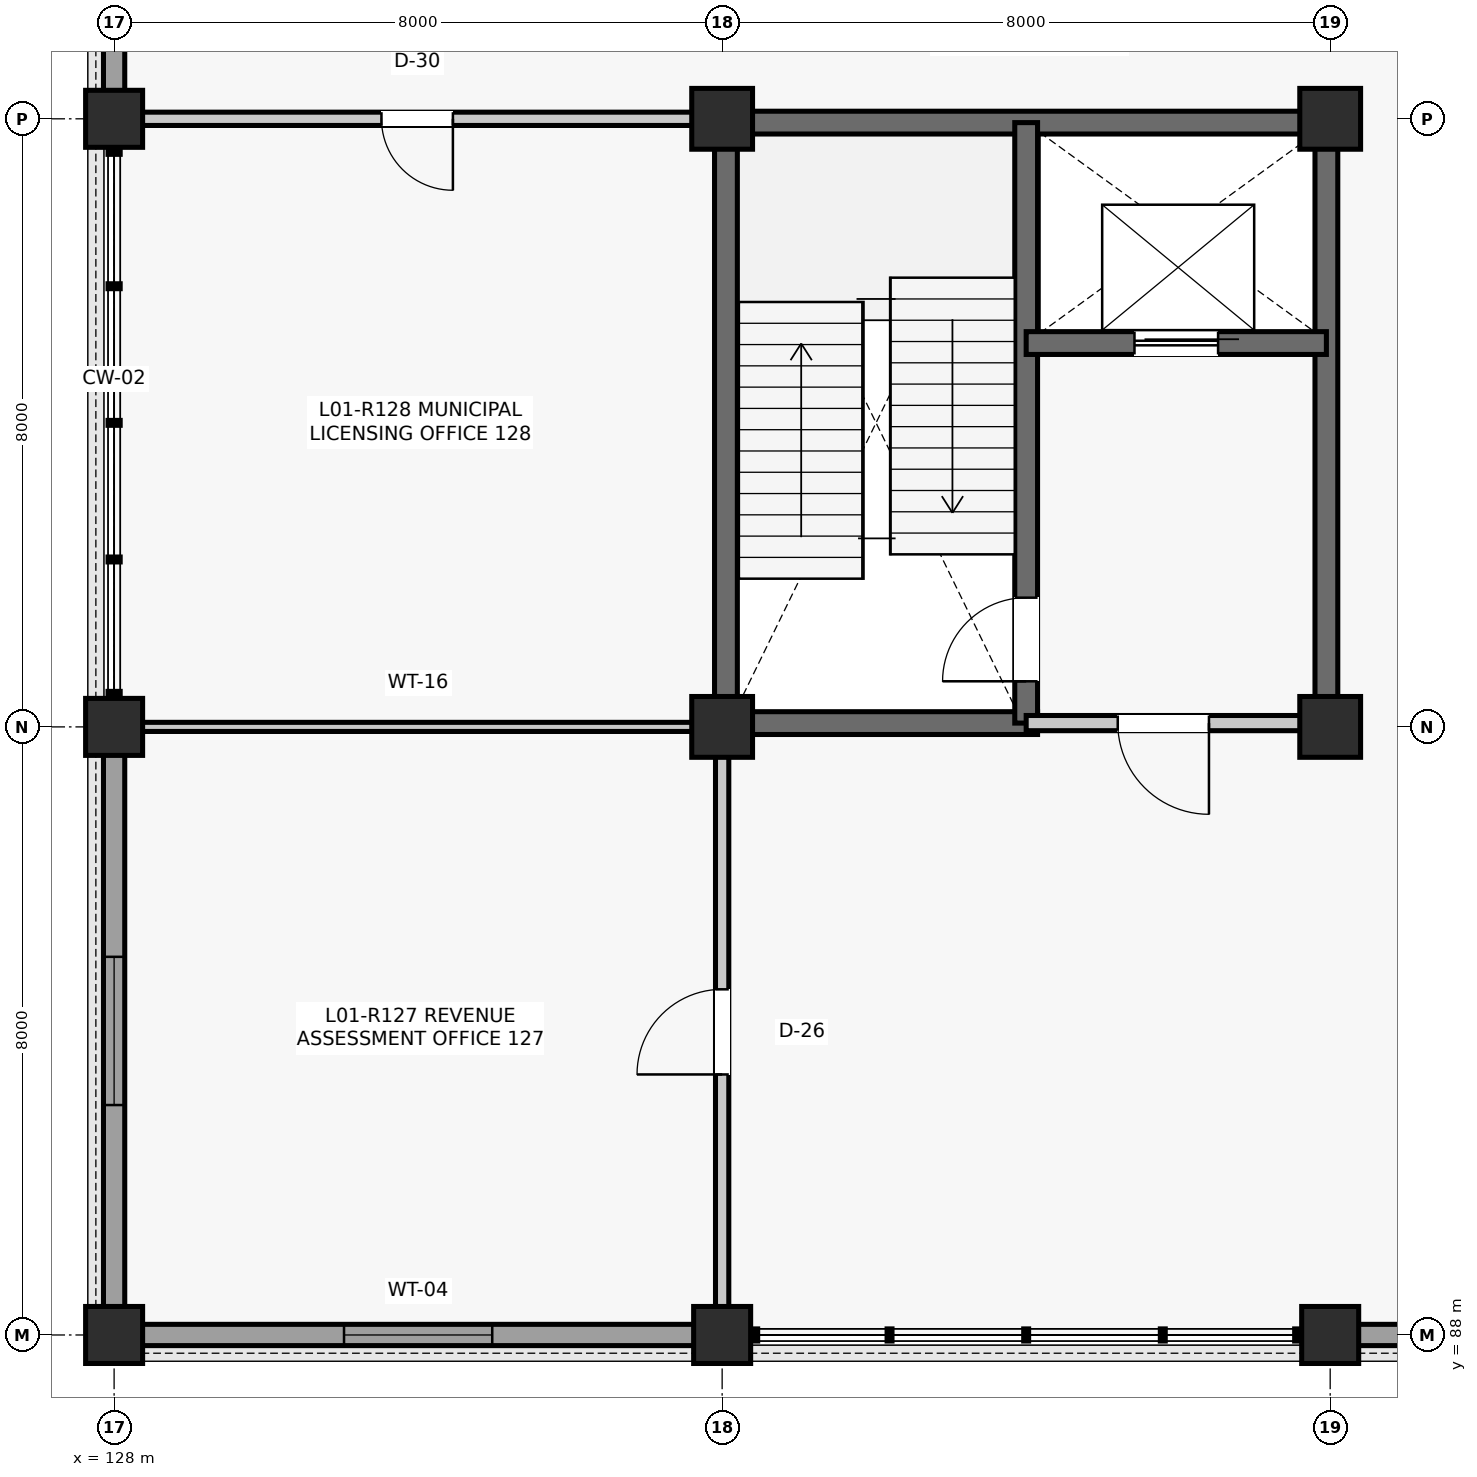
"""IFC4 building model, lengths in metres.
Left out: names, types, materials, properties, quantities, classifications, styles, units other than length and angle.
Written with IfcOpenShell. Run it as: python <this file> out.ifc"""

import sys

from ifc_helpers import new_model, si_unit, direction, frame, frame_2d, origin, origin_2d, place, context, subcontext, project, spatial, rectangle, extrude, element, fill, save


model = new_model("IFC4")
c1 = context("Model", 3, precision=1e-05, world=origin(), true_north=direction((0.0, 1.0)))
c2 = subcontext(c1, "Body", "Model", "MODEL_VIEW")
j1 = project(units=[si_unit("LENGTHUNIT", "METRE"), si_unit("PLANEANGLEUNIT", "RADIAN")], contexts=[c1])
p1 = place(None, origin())
s1 = spatial("IfcSite", under=j1, at=p1, CompositionType="ELEMENT")
p2 = place(p1, origin())
s2 = spatial("IfcBuilding", under=s1, at=p2, CompositionType="ELEMENT")
p3 = place(p2, frame((0.0, 0.0, 5.28)))
s3 = spatial("IfcBuildingStorey", under=s2, at=p3, CompositionType="ELEMENT", Elevation=5.28)
for number, where, z_axis, x_axis in (
    (1, (128.0, 88.0, 0.0), (0.0, 0.0, 1.0), (1.0, 0.0, 0.0)),
    (2, (128.0, 96.0, 0.0), (0.0, 0.0, 1.0), (1.0, 0.0, 0.0)),
    (3, (128.0, 104.0, 0.0), (0.0, 0.0, 1.0), (1.0, 0.0, 0.0)),
    (4, (136.0, 88.0, 0.0), (0.0, 0.0, 1.0), (1.0, 0.0, 0.0)),
):
    element("IfcColumn", number, at=place(p3, frame(where, z_axis=z_axis, x_axis=x_axis)), inside=s3, PredefinedType="COLUMN", context=c2, shape_type="SweptSolid", body=[
        extrude(rectangle(XDim=0.75, YDim=0.75, at=origin_2d()), origin(), (0.0, 0.0, 1.0), 4.62),
    ])
for number, where, z_axis, x_axis in (
    (5, (136.0, 96.0, 0.0), (0.0, 0.0, 1.0), (1.0, 0.0, 0.0)),
    (6, (136.0, 104.0, 0.0), (0.0, 0.0, 1.0), (1.0, 0.0, 0.0)),
):
    element("IfcColumn", number, at=place(p3, frame(where, z_axis=z_axis, x_axis=x_axis)), inside=s3, PredefinedType="COLUMN", context=c2, shape_type="SweptSolid", body=[
        extrude(rectangle(XDim=0.8, YDim=0.8, at=origin_2d()), origin(), (0.0, 0.0, 1.0), 4.62),
    ])
p4 = place(p3, frame((144.0, 88.0, 0.0), z_axis=(0.0, 0.0, 1.0), x_axis=(1.0, 0.0, 0.0)))
e7 = element("IfcColumn", 7, at=p4, inside=s3, PredefinedType="COLUMN", context=c2, shape_type="SweptSolid", body=[
    extrude(rectangle(XDim=0.75, YDim=0.75, at=origin_2d()), origin(), (0.0, 0.0, 1.0), 4.62),
])
for number, where, z_axis, x_axis in (
    (8, (144.0, 96.0, 0.0), (0.0, 0.0, 1.0), (1.0, 0.0, 0.0)),
    (9, (144.0, 104.0, 0.0), (0.0, 0.0, 1.0), (1.0, 0.0, 0.0)),
):
    element("IfcColumn", number, at=place(p3, frame(where, z_axis=z_axis, x_axis=x_axis)), inside=s3, PredefinedType="COLUMN", context=c2, shape_type="SweptSolid", body=[
        extrude(rectangle(XDim=0.8, YDim=0.8, at=origin_2d()), origin(), (0.0, 0.0, 1.0), 4.62),
    ])
p5 = place(p3, frame((128.36, 88.0, 0.0), z_axis=(0.0, 0.0, 1.0), x_axis=(1.0, 0.0, 0.0)))
e10 = element("IfcWall", 10, at=p5, inside=s3, PredefinedType="SOLIDWALL", context=c2, shape_type="SweptSolid", body=[
    extrude(rectangle(XDim=7.28, YDim=0.28, at=frame_2d((3.64, 0.0))), origin(), (0.0, 0.0, 1.0), 3.91),
])
p6 = place(p5, frame((2.665, 0.0, 0.9)))
e11 = element("IfcOpeningElement", 11, at=p6, cuts=e10, PredefinedType="OPENING", context=c2, shape_type="SweptSolid", body=[
    extrude(rectangle(XDim=1.95, YDim=2.45, at=frame_2d((0.975, 1.225))), frame((0.0, 0.15, 0.0), z_axis=(0.0, -1.0, 0.0), x_axis=(1.0, 0.0, 0.0)), (0.0, 0.0, 1.0), 0.3),
])
p7 = place(p3, frame((128.0, 88.36, 0.0), z_axis=(0.0, 0.0, 1.0), x_axis=(0.0, 1.0, 0.0)))
e12 = element("IfcWall", 12, at=p7, inside=s3, PredefinedType="SOLIDWALL", context=c2, shape_type="SweptSolid", body=[
    extrude(rectangle(XDim=7.28, YDim=0.28, at=frame_2d((3.64, 0.0))), origin(), (0.0, 0.0, 1.0), 3.91),
])
p8 = place(p7, frame((2.665, 0.0, 0.9)))
e13 = element("IfcOpeningElement", 13, at=p8, cuts=e12, PredefinedType="OPENING", context=c2, shape_type="SweptSolid", body=[
    extrude(rectangle(XDim=1.95, YDim=2.45, at=frame_2d((0.975, 1.225))), frame((0.0, 0.15, 0.0), z_axis=(0.0, -1.0, 0.0), x_axis=(1.0, 0.0, 0.0)), (0.0, 0.0, 1.0), 0.3),
])
p9 = place(p3, frame((128.0, 104.36, 0.0), z_axis=(0.0, 0.0, 1.0), x_axis=(0.0, 1.0, 0.0)))
e14 = element("IfcWall", 14, at=p9, inside=s3, PredefinedType="SOLIDWALL", context=c2, shape_type="SweptSolid", body=[
    extrude(rectangle(XDim=7.28, YDim=0.28, at=frame_2d((3.64, 0.0))), origin(), (0.0, 0.0, 1.0), 3.914),
])
p10 = place(p9, frame((0.735, 0.0, 0.95)))
e15 = element("IfcOpeningElement", 15, at=p10, cuts=e14, PredefinedType="OPENING", context=c2, shape_type="SweptSolid", body=[
    extrude(rectangle(XDim=1.15, YDim=1.65, at=frame_2d((0.575, 0.825))), frame((0.0, 0.15, 0.0), z_axis=(0.0, -1.0, 0.0), x_axis=(1.0, 0.0, 0.0)), (0.0, 0.0, 1.0), 0.3),
])
p11 = place(p9, frame((5.395, 0.0, 0.95)))
e16 = element("IfcOpeningElement", 16, at=p11, cuts=e14, PredefinedType="OPENING", context=c2, shape_type="SweptSolid", body=[
    extrude(rectangle(XDim=1.15, YDim=1.65, at=frame_2d((0.575, 0.825))), frame((0.0, 0.15, 0.0), z_axis=(0.0, -1.0, 0.0), x_axis=(1.0, 0.0, 0.0)), (0.0, 0.0, 1.0), 0.3),
])
p12 = place(p3, frame((144.36, 88.0, 0.0), z_axis=(0.0, 0.0, 1.0), x_axis=(1.0, 0.0, 0.0)))
e17 = element("IfcWall", 17, at=p12, inside=s3, PredefinedType="SOLIDWALL", context=c2, shape_type="SweptSolid", body=[
    extrude(rectangle(XDim=7.28, YDim=0.28, at=frame_2d((3.64, 0.0))), origin(), (0.0, 0.0, 1.0), 3.914),
])
p13 = place(p12, frame((0.735, 0.0, 0.95)))
e18 = element("IfcOpeningElement", 18, at=p13, cuts=e17, PredefinedType="OPENING", context=c2, shape_type="SweptSolid", body=[
    extrude(rectangle(XDim=1.15, YDim=1.65, at=frame_2d((0.575, 0.825))), frame((0.0, 0.15, 0.0), z_axis=(0.0, -1.0, 0.0), x_axis=(1.0, 0.0, 0.0)), (0.0, 0.0, 1.0), 0.3),
])
p14 = place(p12, frame((5.395, 0.0, 0.95)))
e19 = element("IfcOpeningElement", 19, at=p14, cuts=e17, PredefinedType="OPENING", context=c2, shape_type="SweptSolid", body=[
    extrude(rectangle(XDim=1.15, YDim=1.65, at=frame_2d((0.575, 0.825))), frame((0.0, 0.15, 0.0), z_axis=(0.0, -1.0, 0.0), x_axis=(1.0, 0.0, 0.0)), (0.0, 0.0, 1.0), 0.3),
])
for number, where, z_axis, x_axis in (
    (20, (136.05, 96.29, 0.0), (0.0, 0.0, 1.0), (0.0, 1.0, 0.0)),
    (21, (136.29, 103.95, 0.0), (0.0, 0.0, 1.0), (1.0, 0.0, 0.0)),
    (22, (143.95, 96.29, 0.0), (0.0, 0.0, 1.0), (0.0, 1.0, 0.0)),
):
    element("IfcWall", number, at=place(p3, frame(where, z_axis=z_axis, x_axis=x_axis)), inside=s3, PredefinedType="SHEAR", context=c2, shape_type="SweptSolid", body=[
        extrude(rectangle(XDim=7.42, YDim=0.3, at=frame_2d((3.71, 0.0))), origin(), (0.0, 0.0, 1.0), 4.335),
    ])
p15 = place(p3, frame((136.29, 96.05, 0.0), z_axis=(0.0, 0.0, 1.0), x_axis=(1.0, 0.0, 0.0)))
e23 = element("IfcWall", 23, at=p15, inside=s3, PredefinedType="SHEAR", context=c2, shape_type="SweptSolid", body=[
    extrude(rectangle(XDim=3.86, YDim=0.3, at=frame_2d((1.93, 0.0))), origin(), (0.0, 0.0, 1.0), 4.335),
])
p16 = place(p3, frame((140.0, 96.05, 0.0), z_axis=(0.0, 0.0, 1.0), x_axis=(0.0, 1.0, 0.0)))
e24 = element("IfcWall", 24, at=p16, inside=s3, PredefinedType="SHEAR", context=c2, shape_type="SweptSolid", body=[
    extrude(rectangle(XDim=7.9, YDim=0.3, at=frame_2d((3.95, 0.0))), origin(), (0.0, 0.0, 1.0), 4.335),
])
p17 = place(p16, frame((0.55, 0.0, 0.0)))
e25 = element("IfcOpeningElement", 25, at=p17, cuts=e24, PredefinedType="OPENING", context=c2, shape_type="SweptSolid", body=[
    extrude(rectangle(XDim=1.1, YDim=2.15, at=frame_2d((0.55, 1.075))), frame((0.0, 0.16, 0.0), z_axis=(0.0, -1.0, 0.0), x_axis=(1.0, 0.0, 0.0)), (0.0, 0.0, 1.0), 0.32),
])
p18 = place(p3, frame((140.0, 101.05, 0.0), z_axis=(0.0, 0.0, 1.0), x_axis=(1.0, 0.0, 0.0)))
e26 = element("IfcWall", 26, at=p18, inside=s3, PredefinedType="SHEAR", context=c2, shape_type="SweptSolid", body=[
    extrude(rectangle(XDim=3.95, YDim=0.3, at=frame_2d((1.975, 0.0))), origin(), (0.0, 0.0, 1.0), 4.335),
])
p19 = place(p18, frame((1.425, 0.0, 0.0)))
e27 = element("IfcOpeningElement", 27, at=p19, cuts=e26, PredefinedType="OPENING", context=c2, shape_type="SweptSolid", body=[
    extrude(rectangle(XDim=1.1, YDim=2.2, at=frame_2d((0.55, 1.1))), frame((0.0, 0.16, 0.0), z_axis=(0.0, -1.0, 0.0), x_axis=(1.0, 0.0, 0.0)), (0.0, 0.0, 1.0), 0.32),
])
p20 = place(p3, frame((140.0, 96.05, 0.0), z_axis=(0.0, 0.0, 1.0), x_axis=(1.0, 0.0, 0.0)))
e28 = element("IfcWall", 28, at=p20, inside=s3, PredefinedType="PARTITIONING", context=c2, shape_type="SweptSolid", body=[
    extrude(rectangle(XDim=3.61, YDim=0.2, at=frame_2d((1.805, 0.0))), origin(), (0.0, 0.0, 1.0), 3.787),
])
p21 = place(p20, frame((1.205, 0.0, 0.0)))
e29 = element("IfcOpeningElement", 29, at=p21, cuts=e28, PredefinedType="OPENING", context=c2, shape_type="SweptSolid", body=[
    extrude(rectangle(XDim=1.2, YDim=2.15, at=frame_2d((0.6, 1.075))), frame((0.0, 0.11, 0.0), z_axis=(0.0, -1.0, 0.0), x_axis=(1.0, 0.0, 0.0)), (0.0, 0.0, 1.0), 0.22),
])
p22 = place(p3, frame((136.0, 88.365, 0.0), z_axis=(0.0, 0.0, 1.0), x_axis=(0.0, 1.0, 0.0)))
e30 = element("IfcWall", 30, at=p22, inside=s3, PredefinedType="PARTITIONING", context=c2, shape_type="SweptSolid", body=[
    extrude(rectangle(XDim=7.245, YDim=0.175, at=frame_2d((3.623, 0.0))), origin(), (0.0, 0.0, 1.0), 3.787),
])
p23 = place(p22, frame((3.062, 0.0, 0.0)))
e31 = element("IfcOpeningElement", 31, at=p23, cuts=e30, PredefinedType="OPENING", context=c2, shape_type="SweptSolid", body=[
    extrude(rectangle(XDim=1.12, YDim=2.22, at=frame_2d((0.56, 1.11))), frame((0.0, 0.097, 0.0), z_axis=(0.0, -1.0, 0.0), x_axis=(1.0, 0.0, 0.0)), (0.0, 0.0, 1.0), 0.195),
])
p24 = place(p3, frame((128.365, 96.0, 0.0), z_axis=(0.0, 0.0, 1.0), x_axis=(1.0, 0.0, 0.0)))
e32 = element("IfcWall", 32, at=p24, inside=s3, PredefinedType="PARTITIONING", context=c2, shape_type="SweptSolid", body=[
    extrude(rectangle(XDim=7.245, YDim=0.12, at=frame_2d((3.623, 0.0))), origin(), (0.0, 0.0, 1.0), 3.712),
])
p25 = place(p3, frame((128.365, 104.0, 0.0), z_axis=(0.0, 0.0, 1.0), x_axis=(1.0, 0.0, 0.0)))
e33 = element("IfcWall", 33, at=p25, inside=s3, PredefinedType="PARTITIONING", context=c2, shape_type="SweptSolid", body=[
    extrude(rectangle(XDim=7.245, YDim=0.175, at=frame_2d((3.623, 0.0))), origin(), (0.0, 0.0, 1.0), 3.787),
])
p26 = place(p25, frame((3.153, 0.0, 0.0)))
e34 = element("IfcOpeningElement", 34, at=p26, cuts=e33, PredefinedType="OPENING", context=c2, shape_type="SweptSolid", body=[
    extrude(rectangle(XDim=0.94, YDim=2.12, at=frame_2d((0.47, 1.06))), frame((0.0, 0.097, 0.0), z_axis=(0.0, -1.0, 0.0), x_axis=(1.0, 0.0, 0.0)), (0.0, 0.0, 1.0), 0.195),
])
p27 = place(p6, origin())
e35 = element("IfcWindow", 35, at=p27, inside=s3, PartitioningType="SINGLE_PANEL", PredefinedType="WINDOW", context=c2, shape_type="SweptSolid", body=[
    extrude(rectangle(XDim=1.95, YDim=2.45, at=frame_2d((0.975, 1.225))), frame((0.0, 0.03, 0.0), z_axis=(0.0, -1.0, 0.0), x_axis=(1.0, 0.0, 0.0)), (0.0, 0.0, 1.0), 0.06),
])
fill(e11, e35)
p28 = place(p8, origin())
e36 = element("IfcWindow", 36, at=p28, inside=s3, PartitioningType="SINGLE_PANEL", PredefinedType="WINDOW", context=c2, shape_type="SweptSolid", body=[
    extrude(rectangle(XDim=1.95, YDim=2.45, at=frame_2d((0.975, 1.225))), frame((0.0, 0.03, 0.0), z_axis=(0.0, -1.0, 0.0), x_axis=(1.0, 0.0, 0.0)), (0.0, 0.0, 1.0), 0.06),
])
fill(e13, e36)
p29 = place(p17, origin())
e37 = element("IfcDoor", 37, at=p29, inside=s3, OperationType="SINGLE_SWING_LEFT", PredefinedType="DOOR", context=c2, shape_type="SweptSolid", body=[
    extrude(rectangle(XDim=1.1, YDim=2.15, at=frame_2d((0.55, 1.075))), frame((0.0, 0.025, 0.0), z_axis=(0.0, -1.0, 0.0), x_axis=(1.0, 0.0, 0.0)), (0.0, 0.0, 1.0), 0.05),
])
fill(e25, e37)
p30 = place(p19, origin())
e38 = element("IfcDoor", 38, at=p30, inside=s3, OperationType="SLIDING_TO_LEFT", PredefinedType="DOOR", context=c2, shape_type="SweptSolid", body=[
    extrude(rectangle(XDim=1.1, YDim=2.2, at=frame_2d((0.55, 1.1))), frame((0.0, 0.025, 0.0), z_axis=(0.0, -1.0, 0.0), x_axis=(1.0, 0.0, 0.0)), (0.0, 0.0, 1.0), 0.05),
])
fill(e27, e38)
p31 = place(p21, frame((1.2, 0.0, 0.0), z_axis=(0.0, 0.0, 1.0), x_axis=(-1.0, 0.0, 0.0)))
e39 = element("IfcDoor", 39, at=p31, inside=s3, OperationType="SINGLE_SWING_RIGHT", PredefinedType="DOOR", context=c2, shape_type="SweptSolid", body=[
    extrude(rectangle(XDim=1.2, YDim=2.15, at=frame_2d((0.6, 1.075))), frame((0.0, 0.025, 0.0), z_axis=(0.0, -1.0, 0.0), x_axis=(1.0, 0.0, 0.0)), (0.0, 0.0, 1.0), 0.05),
])
fill(e29, e39)
p32 = place(p23, origin())
e40 = element("IfcDoor", 40, at=p32, inside=s3, OperationType="SINGLE_SWING_LEFT", PredefinedType="DOOR", context=c2, shape_type="SweptSolid", body=[
    extrude(rectangle(XDim=1.12, YDim=2.22, at=frame_2d((0.56, 1.11))), frame((0.0, 0.025, 0.0), z_axis=(0.0, -1.0, 0.0), x_axis=(1.0, 0.0, 0.0)), (0.0, 0.0, 1.0), 0.05),
])
fill(e31, e40)
p33 = place(p26, frame((0.94, 0.0, 0.0), z_axis=(0.0, 0.0, 1.0), x_axis=(-1.0, 0.0, 0.0)))
e41 = element("IfcDoor", 41, at=p33, inside=s3, OperationType="SINGLE_SWING_RIGHT", PredefinedType="DOOR", context=c2, shape_type="SweptSolid", body=[
    extrude(rectangle(XDim=0.94, YDim=2.12, at=frame_2d((0.47, 1.06))), frame((0.0, 0.025, 0.0), z_axis=(0.0, -1.0, 0.0), x_axis=(1.0, 0.0, 0.0)), (0.0, 0.0, 1.0), 0.05),
])
fill(e34, e41)
save(model, sys.argv[1])
